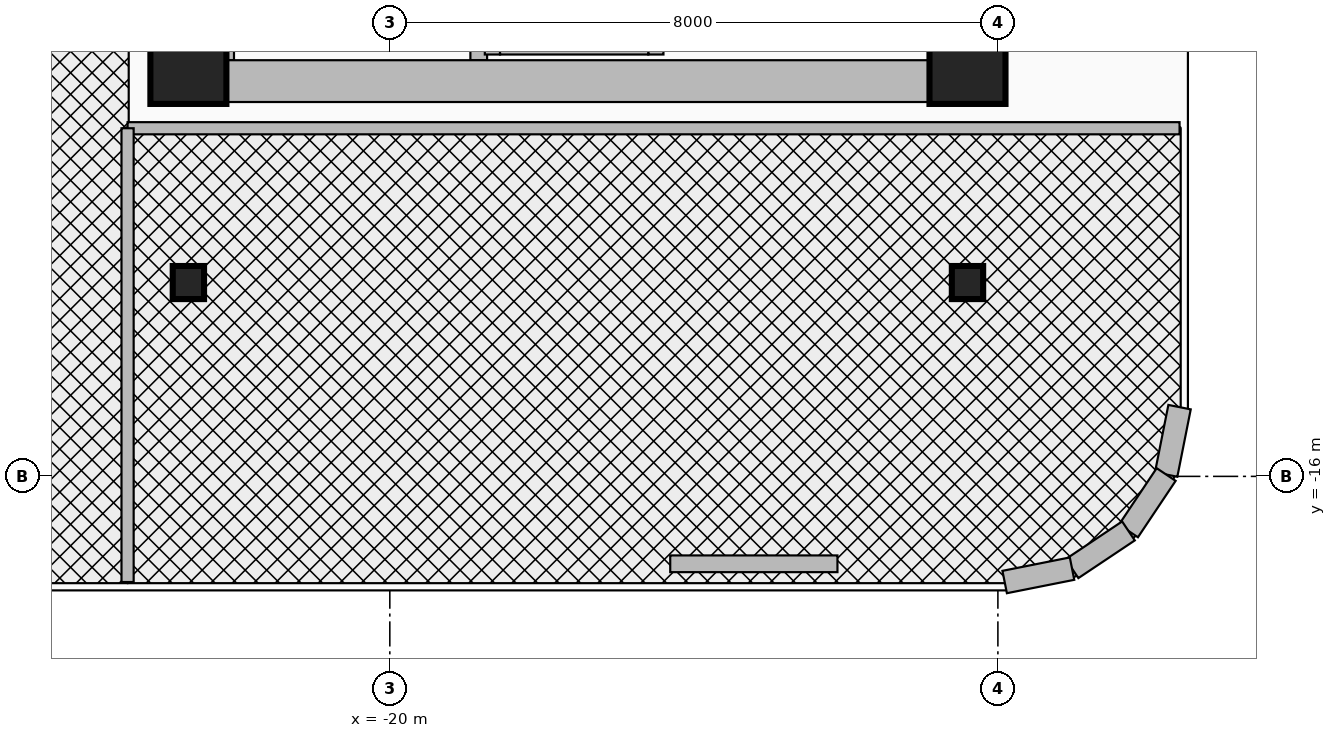
"""IFC4 building model, lengths in metres.
Left out: names, types, materials, properties, quantities, classifications, styles, units other than length and angle.
Written with IfcOpenShell. Run it as: python <this file> out.ifc"""

import sys

from ifc_helpers import new_model, si_unit, direction, frame, frame_2d, origin, origin_2d, place, context, subcontext, project, spatial, rectangle, i_section, extrude, source, transform, mapped, element, fill, save


model = new_model("IFC4")
c1 = context("Model", 3, precision=1e-05, world=origin(), true_north=direction((0.0, 1.0)))
c2 = subcontext(c1, "Body", "Model", "MODEL_VIEW")
j1 = project(units=[si_unit("LENGTHUNIT", "METRE"), si_unit("PLANEANGLEUNIT", "RADIAN")], contexts=[c1])
p1 = place(None, origin())
s1 = spatial("IfcSite", under=j1, at=p1, CompositionType="ELEMENT")
p2 = place(p1, origin())
s2 = spatial("IfcBuilding", under=s1, at=p2, CompositionType="ELEMENT")
p3 = place(p2, frame((0.0, 0.0, 172.3)))
s3 = spatial("IfcBuildingStorey", under=s2, at=p3, CompositionType="ELEMENT", Elevation=172.3)
for number, where, z_axis, x_axis in (
    (1, (-22.16, -10.525, 0.0), (0.0, 0.0, 1.0), (0.0, 1.0, 0.0)),
    (2, (-18.83, -10.525, 0.0), (0.0, 0.0, 1.0), (0.0, 1.0, 0.0)),
):
    element("IfcWall", number, at=place(p3, frame(where, z_axis=z_axis, x_axis=x_axis)), inside=s3, PredefinedType="SHEAR", context=c2, shape_type="SweptSolid", body=[
        extrude(rectangle(XDim=8.745, YDim=0.22, at=frame_2d((4.373, 0.0))), origin(), (0.0, 0.0, 1.0), 3.93),
    ])
p4 = place(p3, frame((-22.65, -11.075, 0.0), z_axis=(0.0, 0.0, 1.0), x_axis=(0.0, 1.0, 0.0)))
e3 = element("IfcWall", 3, at=p4, inside=s3, PredefinedType="SHEAR", context=c2, shape_type="SweptSolid", body=[
    extrude(rectangle(XDim=22.15, YDim=0.55, at=frame_2d((11.075, 0.0))), origin(), (0.0, 0.0, 1.0), 3.93),
])
p5 = place(p3, frame((-22.65, -10.8, 0.0), z_axis=(0.0, 0.0, 1.0), x_axis=(1.0, 0.0, 0.0)))
e4 = element("IfcWall", 4, at=p5, inside=s3, PredefinedType="SHEAR", context=c2, shape_type="SweptSolid", body=[
    extrude(rectangle(XDim=10.25, YDim=0.55, at=frame_2d((5.125, 0.0))), origin(), (0.0, 0.0, 1.0), 3.93),
])
m1 = source(origin(), c2, "Body", "SweptSolid", [
    extrude(rectangle(XDim=1.0, YDim=1.0, at=origin_2d()), origin(), (0.0, 0.0, 1.0), 4.25),
])
for number, where, z_axis, x_axis in (
    (5, (-22.65, -10.6, 0.0), (0.0, 0.0, 1.0), (1.0, 0.0, 0.0)),
    (6, (-12.4, -10.6, 0.0), (0.0, 0.0, 1.0), (1.0, 0.0, 0.0)),
):
    element("IfcColumn", number, at=place(p3, frame(where, z_axis=z_axis, x_axis=x_axis)), inside=s3, PredefinedType="COLUMN", context=c2, shape_type="MappedRepresentation", body=[
        mapped(m1, transform((0.0, 0.0, 0.0), x_axis=(1.0, 0.0, 0.0), y_axis=(0.0, 1.0, 0.0), z_axis=(0.0, 0.0, 1.0), scale=1.0)),
    ])
m2 = source(origin(), c2, "Body", "SweptSolid", [
    extrude(i_section(OverallWidth=0.412, OverallDepth=0.435, WebThickness=0.036, FlangeThickness=0.057, at=origin_2d()), origin(), (0.0, 0.0, 1.0), 4.25),
])
for number, where, z_axis, x_axis in (
    (7, (-22.65, -13.45, 0.0), (0.0, 0.0, 1.0), (1.0, 0.0, 0.0)),
    (8, (-12.4, -13.45, 0.0), (0.0, 0.0, 1.0), (1.0, 0.0, 0.0)),
):
    element("IfcColumn", number, at=place(p3, frame(where, z_axis=z_axis, x_axis=x_axis)), inside=s3, PredefinedType="COLUMN", context=c2, shape_type="MappedRepresentation", body=[
        mapped(m2, transform((0.0, 0.0, 0.0), x_axis=(1.0, 0.0, 0.0), y_axis=(0.0, 1.0, 0.0), z_axis=(0.0, 0.0, 1.0), scale=1.0)),
    ])
p6 = place(p3, frame((-9.61, -15.089, 0.0), z_axis=(0.0, 0.0, 1.0), x_axis=(-0.195025152871, -0.980798241101, 0.0)))
e9 = element("IfcWall", 9, at=p6, inside=s3, PredefinedType="SOLIDWALL", context=c2, shape_type="SweptSolid", body=[
    extrude(rectangle(XDim=0.904, YDim=0.3, at=frame_2d((0.452, 0.0))), origin(), (0.0, 0.0, 1.0), 3.93),
])
for number, where, z_axis, x_axis in (
    (10, (-9.786, -15.976, 0.0), (0.0, 0.0, 1.0), (-0.556, -0.832, 0.0)),
    (11, (-10.282, -16.718, 0.0), (0.0, 0.0, 1.0), (-0.832, -0.556, 0.0)),
):
    element("IfcWall", number, at=place(p3, frame(where, z_axis=z_axis, x_axis=x_axis)), inside=s3, PredefinedType="SOLIDWALL", context=c2, shape_type="SweptSolid", body=[
        extrude(rectangle(XDim=0.893, YDim=0.3, at=frame_2d((0.446, 0.0))), origin(), (0.0, 0.0, 1.0), 3.93),
    ])
p7 = place(p3, frame((-11.024, -17.214, 0.0), z_axis=(0.0, 0.0, 1.0), x_axis=(-0.980798241101, -0.195025152871, 0.0)))
e12 = element("IfcWall", 12, at=p7, inside=s3, PredefinedType="SOLIDWALL", context=c2, shape_type="SweptSolid", body=[
    extrude(rectangle(XDim=0.904, YDim=0.3, at=frame_2d((0.452, 0.0))), origin(), (0.0, 0.0, 1.0), 3.93),
])
p8 = place(p3, frame((-14.111, -17.15, 0.0), z_axis=(0.0, 0.0, 1.0), x_axis=(-1.0, 0.0, 0.0)))
e13 = element("IfcWall", 13, at=p8, inside=s3, PredefinedType="SOLIDWALL", context=c2, shape_type="SweptSolid", body=[
    extrude(rectangle(XDim=2.2, YDim=0.22, at=frame_2d((1.1, 0.0))), origin(), (0.0, 0.0, 1.0), 3.93),
])
p9 = place(p8, frame((0.65, 0.0, 0.95)))
e14 = element("IfcOpeningElement", 14, at=p9, cuts=e13, PredefinedType="OPENING", context=c2, shape_type="SweptSolid", body=[
    extrude(rectangle(XDim=0.9, YDim=1.3, at=frame_2d((0.45, 0.65))), frame((0.0, 0.125, 0.0), z_axis=(0.0, -1.0, 0.0), x_axis=(1.0, 0.0, 0.0)), (0.0, 0.0, 1.0), 0.25),
])
for number, where, z_axis, x_axis in (
    (15, (-18.65, -10.45, 0.0), (0.0, 0.0, 1.0), (0.0, 1.0, 0.0)),
    (16, (-16.5, -10.45, 0.0), (0.0, 0.0, 1.0), (0.0, 1.0, 0.0)),
):
    element("IfcWall", number, at=place(p3, frame(where, z_axis=z_axis, x_axis=x_axis)), inside=s3, PredefinedType="MOVABLE", context=c2, shape_type="SweptSolid", body=[
        extrude(rectangle(XDim=2.35, YDim=0.2, at=frame_2d((1.175, 0.0))), origin(), (0.0, 0.0, 1.0), 2.965),
    ])
p10 = place(p3, frame((-18.55, -10.35, 0.0), z_axis=(0.0, 0.0, 1.0), x_axis=(1.0, 0.0, 0.0)))
e17 = element("IfcWall", 17, at=p10, inside=s3, PredefinedType="MOVABLE", context=c2, shape_type="SweptSolid", body=[
    extrude(rectangle(XDim=1.95, YDim=0.2, at=frame_2d((0.975, 0.0))), origin(), (0.0, 0.0, 1.0), 2.965),
])
p11 = place(p3, frame((-23.45, -11.42, 0.0), z_axis=(0.0, 0.0, 1.0), x_axis=(1.0, 0.0, 0.0)))
e18 = element("IfcWall", 18, at=p11, inside=s3, PredefinedType="PARTITIONING", context=c2, shape_type="SweptSolid", body=[
    extrude(rectangle(XDim=13.84, YDim=0.16, at=frame_2d((6.92, 0.0))), origin(), (0.0, 0.0, 1.0), 3.304),
])
p12 = place(p3, frame((-23.45, -17.39, 0.0), z_axis=(0.0, 0.0, 1.0), x_axis=(0.0, 1.0, 0.0)))
e19 = element("IfcWall", 19, at=p12, inside=s3, PredefinedType="PARTITIONING", context=c2, shape_type="SweptSolid", body=[
    extrude(rectangle(XDim=5.97, YDim=0.16, at=frame_2d((2.985, 0.0))), origin(), (0.0, 0.0, 1.0), 3.93),
])
p13 = place(p12, frame((2.535, 0.0, 0.0)))
e20 = element("IfcOpeningElement", 20, at=p13, cuts=e19, PredefinedType="OPENING", context=c2, shape_type="SweptSolid", body=[
    extrude(rectangle(XDim=0.9, YDim=2.1, at=frame_2d((0.45, 1.05))), frame((0.0, 0.095, 0.0), z_axis=(0.0, -1.0, 0.0), x_axis=(1.0, 0.0, 0.0)), (0.0, 0.0, 1.0), 0.19),
])
p14 = place(p9, origin())
e21 = element("IfcWindow", 21, at=p14, inside=s3, PartitioningType="SINGLE_PANEL", PredefinedType="WINDOW", context=c2, shape_type="SweptSolid", body=[
    extrude(rectangle(XDim=0.9, YDim=1.3, at=frame_2d((0.45, 0.65))), frame((0.0, 0.03, 0.0), z_axis=(0.0, -1.0, 0.0), x_axis=(1.0, 0.0, 0.0)), (0.0, 0.0, 1.0), 0.06),
])
fill(e14, e21)
p15 = place(p13, frame((0.9, 0.0, 0.0), z_axis=(0.0, 0.0, 1.0), x_axis=(-1.0, 0.0, 0.0)))
e22 = element("IfcDoor", 22, at=p15, inside=s3, OperationType="SINGLE_SWING_LEFT", PredefinedType="DOOR", context=c2, shape_type="SweptSolid", body=[
    extrude(rectangle(XDim=0.9, YDim=2.1, at=frame_2d((0.45, 1.05))), frame((0.0, 0.025, 0.0), z_axis=(0.0, -1.0, 0.0), x_axis=(1.0, 0.0, 0.0)), (0.0, 0.0, 1.0), 0.05),
])
fill(e20, e22)
save(model, sys.argv[1])
